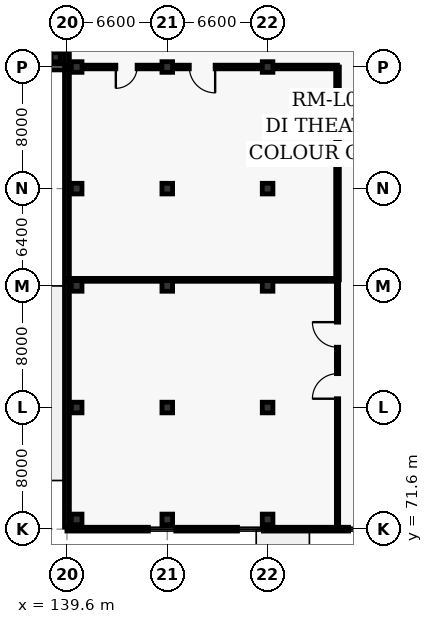
"""IFC4 building model, lengths in metres.
Left out: names, types, materials, properties, quantities, classifications, styles, units other than length and angle.
Written with IfcOpenShell. Run it as: python <this file> out.ifc"""

import sys

from ifc_helpers import new_model, si_unit, direction, frame, frame_2d, origin, origin_2d, place, context, subcontext, project, spatial, rectangle, extrude, element, fill, save


model = new_model("IFC4")
c1 = context("Model", 3, precision=1e-05, world=origin(), true_north=direction((0.0, 1.0)))
c2 = subcontext(c1, "Body", "Model", "MODEL_VIEW")
j1 = project(units=[si_unit("LENGTHUNIT", "METRE"), si_unit("PLANEANGLEUNIT", "RADIAN")], contexts=[c1])
p1 = place(None, origin())
s1 = spatial("IfcSite", under=j1, at=p1, CompositionType="ELEMENT")
p2 = place(p1, origin())
s2 = spatial("IfcBuilding", under=s1, at=p2, CompositionType="ELEMENT")
p3 = place(p2, frame((0.0, 0.0, 15.6)))
s3 = spatial("IfcBuildingStorey", under=s2, at=p3, CompositionType="ELEMENT", Elevation=15.6)
p4 = place(p3, frame((138.86, 102.64, 0.0), z_axis=(0.0, 0.0, 1.0), x_axis=(1.0, 0.0, 0.0)))
e1 = element("IfcColumn", 1, at=p4, inside=s3, PredefinedType="COLUMN", context=c2, shape_type="SweptSolid", body=[
    extrude(rectangle(XDim=0.6, YDim=0.6, at=origin_2d()), origin(), (0.0, 0.0, 1.0), 4.8),
])
for number, where, z_axis, x_axis in (
    (2, (140.24, 72.24, 0.0), (0.0, 0.0, 1.0), (1.0, 0.0, 0.0)),
    (3, (140.24, 79.6, 0.0), (0.0, 0.0, 1.0), (1.0, 0.0, 0.0)),
    (4, (140.24, 87.6, 0.0), (0.0, 0.0, 1.0), (1.0, 0.0, 0.0)),
    (5, (140.24, 94.0, 0.0), (0.0, 0.0, 1.0), (1.0, 0.0, 0.0)),
    (6, (140.24, 102.0, 0.0), (0.0, 0.0, 1.0), (1.0, 0.0, 0.0)),
    (7, (146.2, 72.24, 0.0), (0.0, 0.0, 1.0), (1.0, 0.0, 0.0)),
    (8, (146.2, 79.6, 0.0), (0.0, 0.0, 1.0), (1.0, 0.0, 0.0)),
    (9, (146.2, 87.6, 0.0), (0.0, 0.0, 1.0), (1.0, 0.0, 0.0)),
    (10, (146.2, 94.0, 0.0), (0.0, 0.0, 1.0), (1.0, 0.0, 0.0)),
    (11, (146.2, 102.0, 0.0), (0.0, 0.0, 1.0), (1.0, 0.0, 0.0)),
    (12, (152.8, 72.24, 0.0), (0.0, 0.0, 1.0), (1.0, 0.0, 0.0)),
    (13, (152.8, 79.6, 0.0), (0.0, 0.0, 1.0), (1.0, 0.0, 0.0)),
    (14, (152.8, 87.6, 0.0), (0.0, 0.0, 1.0), (1.0, 0.0, 0.0)),
    (15, (152.8, 94.0, 0.0), (0.0, 0.0, 1.0), (1.0, 0.0, 0.0)),
    (16, (152.8, 102.0, 0.0), (0.0, 0.0, 1.0), (1.0, 0.0, 0.0)),
):
    element("IfcColumn", number, at=place(p3, frame(where, z_axis=z_axis, x_axis=x_axis)), inside=s3, PredefinedType="COLUMN", context=c2, shape_type="SweptSolid", body=[
        extrude(rectangle(XDim=0.7, YDim=0.7, at=origin_2d()), origin(), (0.0, 0.0, 1.0), 4.8),
    ])
p5 = place(p3, frame((139.5, 102.0, 0.0), z_axis=(0.0, 0.0, 1.0), x_axis=(-1.0, 0.0, 0.0)))
e17 = element("IfcWall", 17, at=p5, inside=s3, PredefinedType="SOLIDWALL", context=c2, shape_type="SweptSolid", body=[
    extrude(rectangle(XDim=28.7, YDim=0.38, at=frame_2d((14.35, 0.0))), origin(), (0.0, 0.0, 1.0), 4.555),
])
p6 = place(p5, frame((2.2, 0.0, 0.9)))
e18 = element("IfcOpeningElement", 18, at=p6, cuts=e17, PredefinedType="OPENING", context=c2, shape_type="SweptSolid", body=[
    extrude(rectangle(XDim=3.2, YDim=1.85, at=frame_2d((1.6, 0.925))), frame((0.0, 0.2, 0.0), z_axis=(0.0, -1.0, 0.0), x_axis=(1.0, 0.0, 0.0)), (0.0, 0.0, 1.0), 0.4),
])
p7 = place(p5, frame((8.475, 0.0, 0.9)))
e19 = element("IfcOpeningElement", 19, at=p7, cuts=e17, PredefinedType="OPENING", context=c2, shape_type="SweptSolid", body=[
    extrude(rectangle(XDim=3.4, YDim=1.85, at=frame_2d((1.7, 0.925))), frame((0.0, 0.2, 0.0), z_axis=(0.0, -1.0, 0.0), x_axis=(1.0, 0.0, 0.0)), (0.0, 0.0, 1.0), 0.4),
])
p8 = place(p5, frame((14.75, 0.0, 0.9)))
e20 = element("IfcOpeningElement", 20, at=p8, cuts=e17, PredefinedType="OPENING", context=c2, shape_type="SweptSolid", body=[
    extrude(rectangle(XDim=3.6, YDim=1.9, at=frame_2d((1.8, 0.95))), frame((0.0, 0.2, 0.0), z_axis=(0.0, -1.0, 0.0), x_axis=(1.0, 0.0, 0.0)), (0.0, 0.0, 1.0), 0.4),
])
p9 = place(p5, frame((21.025, 0.0, 0.9)))
e21 = element("IfcOpeningElement", 21, at=p9, cuts=e17, PredefinedType="OPENING", context=c2, shape_type="SweptSolid", body=[
    extrude(rectangle(XDim=3.8, YDim=1.9, at=frame_2d((1.9, 0.95))), frame((0.0, 0.2, 0.0), z_axis=(0.0, -1.0, 0.0), x_axis=(1.0, 0.0, 0.0)), (0.0, 0.0, 1.0), 0.4),
])
p10 = place(p3, frame((172.0, 71.6, 0.0), z_axis=(0.0, 0.0, 1.0), x_axis=(-1.0, 0.0, 0.0)))
e22 = element("IfcWall", 22, at=p10, inside=s3, PredefinedType="SOLIDWALL", context=c2, shape_type="SweptSolid", body=[
    extrude(rectangle(XDim=32.4, YDim=0.25, at=frame_2d((16.2, 0.0))), origin(), (0.0, 0.0, 1.0), 4.58),
])
p11 = place(p10, frame((7.96, 0.0, 0.8)))
e23 = element("IfcOpeningElement", 23, at=p11, cuts=e22, PredefinedType="OPENING", context=c2, shape_type="SweptSolid", body=[
    extrude(rectangle(XDim=1.5, YDim=2.1, at=frame_2d((0.75, 1.05))), frame((0.0, 0.135, 0.0), z_axis=(0.0, -1.0, 0.0), x_axis=(1.0, 0.0, 0.0)), (0.0, 0.0, 1.0), 0.27),
])
p12 = place(p10, frame((12.27, 0.0, 0.8)))
e24 = element("IfcOpeningElement", 24, at=p12, cuts=e22, PredefinedType="OPENING", context=c2, shape_type="SweptSolid", body=[
    extrude(rectangle(XDim=1.6, YDim=2.1, at=frame_2d((0.8, 1.05))), frame((0.0, 0.135, 0.0), z_axis=(0.0, -1.0, 0.0), x_axis=(1.0, 0.0, 0.0)), (0.0, 0.0, 1.0), 0.27),
])
p13 = place(p10, frame((19.48, 0.0, 0.8)))
e25 = element("IfcOpeningElement", 25, at=p13, cuts=e22, PredefinedType="OPENING", context=c2, shape_type="SweptSolid", body=[
    extrude(rectangle(XDim=1.7, YDim=2.15, at=frame_2d((0.85, 1.075))), frame((0.0, 0.135, 0.0), z_axis=(0.0, -1.0, 0.0), x_axis=(1.0, 0.0, 0.0)), (0.0, 0.0, 1.0), 0.27),
])
p14 = place(p10, frame((25.24, 0.0, 0.8)))
e26 = element("IfcOpeningElement", 26, at=p14, cuts=e22, PredefinedType="OPENING", context=c2, shape_type="SweptSolid", body=[
    extrude(rectangle(XDim=1.8, YDim=2.15, at=frame_2d((0.9, 1.075))), frame((0.0, 0.135, 0.0), z_axis=(0.0, -1.0, 0.0), x_axis=(1.0, 0.0, 0.0)), (0.0, 0.0, 1.0), 0.27),
])
p15 = place(p3, frame((139.6, 71.74, 0.0), z_axis=(0.0, 0.0, 1.0), x_axis=(0.0, 1.0, 0.0)))
e27 = element("IfcWall", 27, at=p15, inside=s3, PredefinedType="SOLIDWALL", context=c2, shape_type="SweptSolid", body=[
    extrude(rectangle(XDim=46.12, YDim=0.32, at=frame_2d((23.06, 0.0))), origin(), (0.0, 0.0, 1.0), 4.58),
])
p16 = place(p15, frame((31.38, 0.0, 0.0)))
e28 = element("IfcOpeningElement", 28, at=p16, cuts=e27, PredefinedType="OPENING", context=c2, shape_type="SweptSolid", body=[
    extrude(rectangle(XDim=1.4, YDim=2.25, at=frame_2d((0.7, 1.125))), frame((0.0, 0.17, 0.0), z_axis=(0.0, -1.0, 0.0), x_axis=(1.0, 0.0, 0.0)), (0.0, 0.0, 1.0), 0.34),
])
p17 = place(p3, frame((157.4, 102.0, 0.0), z_axis=(0.0, 0.0, 1.0), x_axis=(-1.0, 0.0, 0.0)))
e29 = element("IfcWall", 29, at=p17, inside=s3, PredefinedType="PARTITIONING", context=c2, shape_type="SweptSolid", body=[
    extrude(rectangle(XDim=17.8, YDim=0.24, at=frame_2d((8.9, 0.0))), origin(), (0.0, 0.0, 1.0), 3.93),
])
p18 = place(p17, frame((8.05, 0.0, 0.0)))
e30 = element("IfcOpeningElement", 30, at=p18, cuts=e29, PredefinedType="OPENING", context=c2, shape_type="SweptSolid", body=[
    extrude(rectangle(XDim=1.7, YDim=2.3, at=frame_2d((0.85, 1.15))), frame((0.0, 0.13, 0.0), z_axis=(0.0, -1.0, 0.0), x_axis=(1.0, 0.0, 0.0)), (0.0, 0.0, 1.0), 0.26),
])
p19 = place(p17, frame((13.184, 0.0, 0.0)))
e31 = element("IfcOpeningElement", 31, at=p19, cuts=e29, PredefinedType="OPENING", context=c2, shape_type="SweptSolid", body=[
    extrude(rectangle(XDim=1.4, YDim=2.25, at=frame_2d((0.7, 1.125))), frame((0.0, 0.13, 0.0), z_axis=(0.0, -1.0, 0.0), x_axis=(1.0, 0.0, 0.0)), (0.0, 0.0, 1.0), 0.26),
])
p20 = place(p3, frame((157.4, 71.6, 0.0), z_axis=(0.0, 0.0, 1.0), x_axis=(0.0, 1.0, 0.0)))
e32 = element("IfcWall", 32, at=p20, inside=s3, PredefinedType="PARTITIONING", context=c2, shape_type="SweptSolid", body=[
    extrude(rectangle(XDim=16.4, YDim=0.15, at=frame_2d((8.2, 0.0))), origin(), (0.0, 0.0, 1.0), 4.58),
])
p21 = place(p20, frame((8.58, 0.0, 0.0)))
e33 = element("IfcOpeningElement", 33, at=p21, cuts=e32, PredefinedType="OPENING", context=c2, shape_type="SweptSolid", body=[
    extrude(rectangle(XDim=1.65, YDim=2.3, at=frame_2d((0.825, 1.15))), frame((0.0, 0.085, 0.0), z_axis=(0.0, -1.0, 0.0), x_axis=(1.0, 0.0, 0.0)), (0.0, 0.0, 1.0), 0.17),
])
p22 = place(p20, frame((11.967, 0.0, 0.0)))
e34 = element("IfcOpeningElement", 34, at=p22, cuts=e32, PredefinedType="OPENING", context=c2, shape_type="SweptSolid", body=[
    extrude(rectangle(XDim=1.65, YDim=2.3, at=frame_2d((0.825, 1.15))), frame((0.0, 0.085, 0.0), z_axis=(0.0, -1.0, 0.0), x_axis=(1.0, 0.0, 0.0)), (0.0, 0.0, 1.0), 0.17),
])
p23 = place(p3, frame((157.4, 88.0, 0.0), z_axis=(0.0, 0.0, 1.0), x_axis=(0.0, 1.0, 0.0)))
e35 = element("IfcWall", 35, at=p23, inside=s3, PredefinedType="PARTITIONING", context=c2, shape_type="SweptSolid", body=[
    extrude(rectangle(XDim=14.0, YDim=0.24, at=frame_2d((7.0, 0.0))), origin(), (0.0, 0.0, 1.0), 4.58),
])
p24 = place(p3, frame((139.6, 88.0, 0.0), z_axis=(0.0, 0.0, 1.0), x_axis=(1.0, 0.0, 0.0)))
e36 = element("IfcWall", 36, at=p24, inside=s3, PredefinedType="PARTITIONING", context=c2, shape_type="SweptSolid", body=[
    extrude(rectangle(XDim=17.8, YDim=0.19, at=frame_2d((8.9, 0.0))), origin(), (0.0, 0.0, 1.0), 3.93),
])
p25 = place(p12, origin())
e37 = element("IfcWindow", 37, at=p25, inside=s3, PartitioningType="SINGLE_PANEL", PredefinedType="WINDOW", context=c2, shape_type="SweptSolid", body=[
    extrude(rectangle(XDim=1.6, YDim=2.1, at=frame_2d((0.8, 1.05))), frame((0.0, 0.03, 0.0), z_axis=(0.0, -1.0, 0.0), x_axis=(1.0, 0.0, 0.0)), (0.0, 0.0, 1.0), 0.06),
])
fill(e24, e37)
p26 = place(p13, origin())
e38 = element("IfcWindow", 38, at=p26, inside=s3, PartitioningType="SINGLE_PANEL", PredefinedType="WINDOW", context=c2, shape_type="SweptSolid", body=[
    extrude(rectangle(XDim=1.7, YDim=2.15, at=frame_2d((0.85, 1.075))), frame((0.0, 0.03, 0.0), z_axis=(0.0, -1.0, 0.0), x_axis=(1.0, 0.0, 0.0)), (0.0, 0.0, 1.0), 0.06),
])
fill(e25, e38)
p27 = place(p14, origin())
e39 = element("IfcWindow", 39, at=p27, inside=s3, PartitioningType="SINGLE_PANEL", PredefinedType="WINDOW", context=c2, shape_type="SweptSolid", body=[
    extrude(rectangle(XDim=1.8, YDim=2.15, at=frame_2d((0.9, 1.075))), frame((0.0, 0.03, 0.0), z_axis=(0.0, -1.0, 0.0), x_axis=(1.0, 0.0, 0.0)), (0.0, 0.0, 1.0), 0.06),
])
fill(e26, e39)
p28 = place(p21, origin())
e40 = element("IfcDoor", 40, at=p28, inside=s3, OperationType="SINGLE_SWING_LEFT", PredefinedType="DOOR", context=c2, shape_type="SweptSolid", body=[
    extrude(rectangle(XDim=1.65, YDim=2.3, at=frame_2d((0.825, 1.15))), frame((0.0, 0.025, 0.0), z_axis=(0.0, -1.0, 0.0), x_axis=(1.0, 0.0, 0.0)), (0.0, 0.0, 1.0), 0.05),
])
fill(e33, e40)
p29 = place(p22, origin())
e41 = element("IfcDoor", 41, at=p29, inside=s3, OperationType="SINGLE_SWING_RIGHT", PredefinedType="DOOR", context=c2, shape_type="SweptSolid", body=[
    extrude(rectangle(XDim=1.65, YDim=2.3, at=frame_2d((0.825, 1.15))), frame((0.0, 0.025, 0.0), z_axis=(0.0, -1.0, 0.0), x_axis=(1.0, 0.0, 0.0)), (0.0, 0.0, 1.0), 0.05),
])
fill(e34, e41)
p30 = place(p18, origin())
e42 = element("IfcDoor", 42, at=p30, inside=s3, OperationType="SINGLE_SWING_LEFT", PredefinedType="DOOR", context=c2, shape_type="SweptSolid", body=[
    extrude(rectangle(XDim=1.7, YDim=2.3, at=frame_2d((0.85, 1.15))), frame((0.0, 0.025, 0.0), z_axis=(0.0, -1.0, 0.0), x_axis=(1.0, 0.0, 0.0)), (0.0, 0.0, 1.0), 0.05),
])
fill(e30, e42)
p31 = place(p19, origin())
e43 = element("IfcDoor", 43, at=p31, inside=s3, OperationType="SINGLE_SWING_RIGHT", PredefinedType="DOOR", context=c2, shape_type="SweptSolid", body=[
    extrude(rectangle(XDim=1.4, YDim=2.25, at=frame_2d((0.7, 1.125))), frame((0.0, 0.025, 0.0), z_axis=(0.0, -1.0, 0.0), x_axis=(1.0, 0.0, 0.0)), (0.0, 0.0, 1.0), 0.05),
])
fill(e31, e43)
save(model, sys.argv[1])
